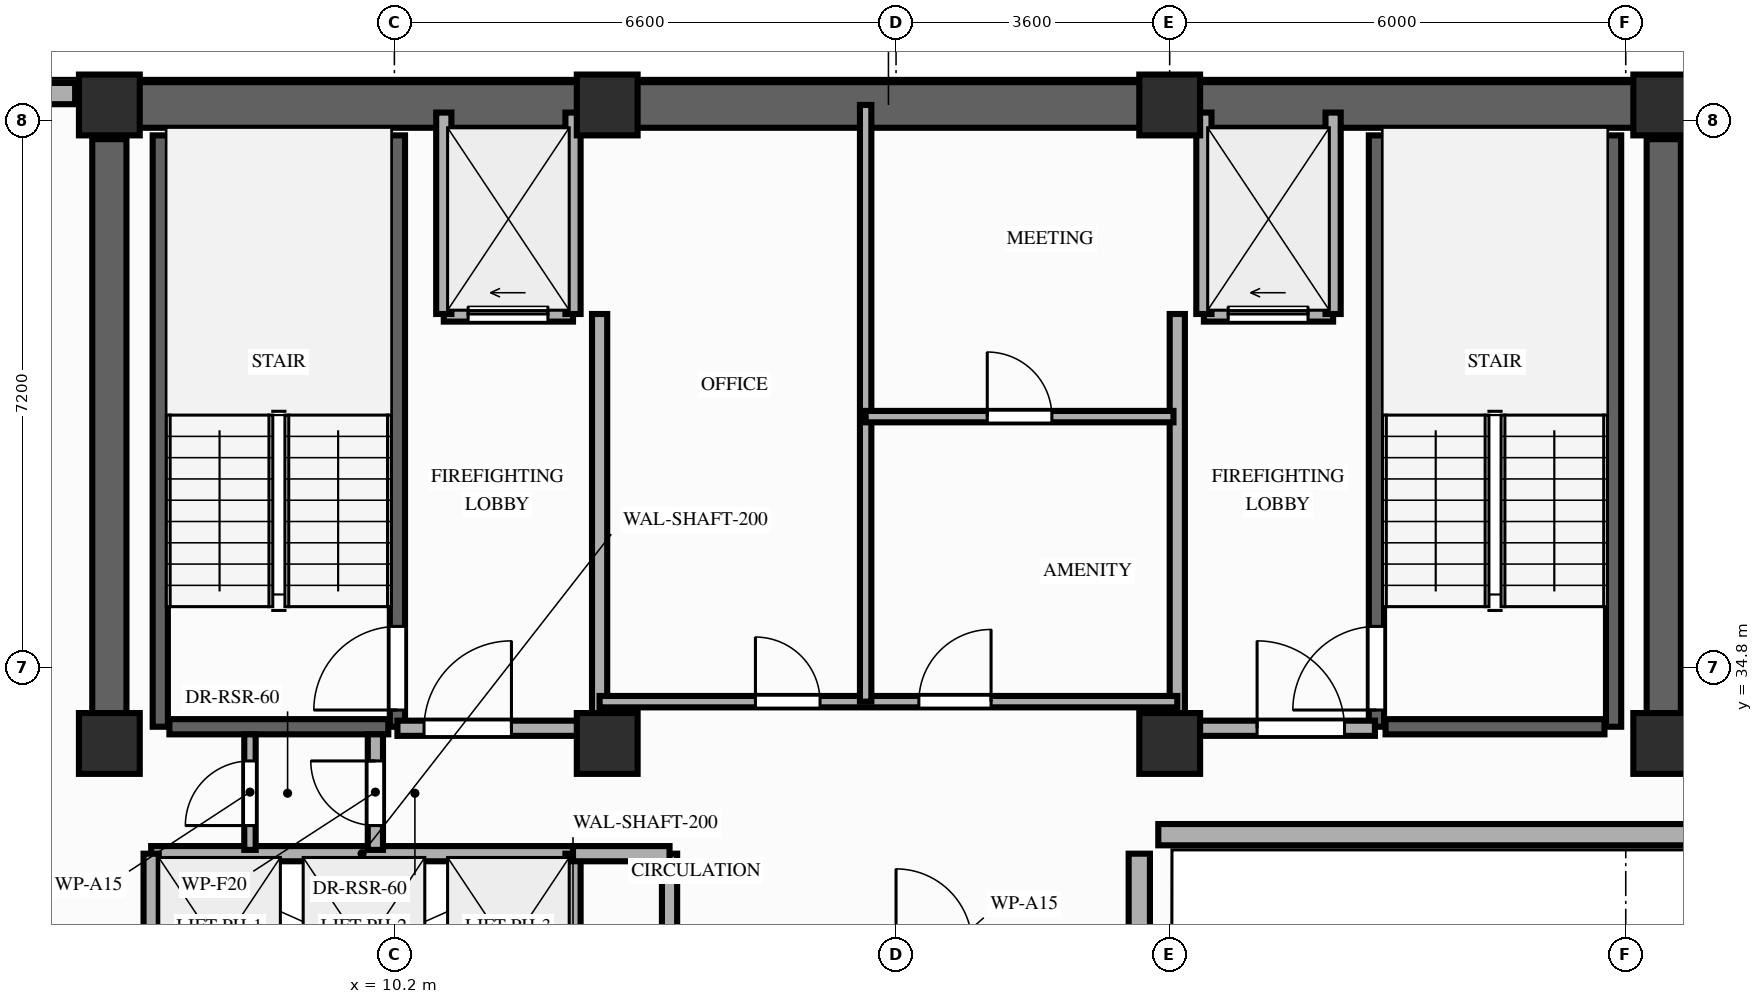
"""IFC4 building model, lengths in metres.
Left out: names, types, materials, properties, quantities, classifications, styles, units other than length and angle.
Written with IfcOpenShell. Run it as: python <this file> out.ifc"""

import sys

from ifc_helpers import new_model, si_unit, direction, frame, frame_2d, origin, origin_2d, place, context, subcontext, project, spatial, rectangle, extrude, element, fill, save


model = new_model("IFC4")
c1 = context("Model", 3, precision=1e-05, world=origin(), true_north=direction((0.0, 1.0)))
c2 = subcontext(c1, "Body", "Model", "MODEL_VIEW")
j1 = project(units=[si_unit("LENGTHUNIT", "METRE"), si_unit("PLANEANGLEUNIT", "RADIAN")], contexts=[c1])
p1 = place(None, origin())
s1 = spatial("IfcSite", under=j1, at=p1, CompositionType="ELEMENT")
p2 = place(p1, origin())
s2 = spatial("IfcBuilding", under=s1, at=p2, CompositionType="ELEMENT")
p3 = place(p2, frame((0.0, 0.0, 240.8)))
s3 = spatial("IfcBuildingStorey", under=s2, at=p3, CompositionType="ELEMENT", Elevation=240.8)
for number, where, z_axis, x_axis in (
    (1, (6.45, 33.8, 0.0), (0.0, 0.0, 1.0), (1.0, 0.0, 0.0)),
    (2, (13.0, 33.8, 0.0), (0.0, 0.0, 1.0), (1.0, 0.0, 0.0)),
    (3, (20.4, 33.8, 0.0), (0.0, 0.0, 1.0), (1.0, 0.0, 0.0)),
    (4, (26.9, 33.8, 0.0), (0.0, 0.0, 1.0), (1.0, 0.0, 0.0)),
    (5, (6.45, 42.2, 0.0), (0.0, 0.0, 1.0), (1.0, 0.0, 0.0)),
    (6, (13.0, 42.2, 0.0), (0.0, 0.0, 1.0), (1.0, 0.0, 0.0)),
    (7, (20.4, 42.2, 0.0), (0.0, 0.0, 1.0), (1.0, 0.0, 0.0)),
    (8, (26.9, 42.2, 0.0), (0.0, 0.0, 1.0), (1.0, 0.0, 0.0)),
):
    element("IfcColumn", number, at=place(p3, frame(where, z_axis=z_axis, x_axis=x_axis)), inside=s3, PredefinedType="COLUMN", context=c2, shape_type="SweptSolid", body=[
        extrude(rectangle(XDim=0.8, YDim=0.8, at=origin_2d()), origin(), (0.0, 0.0, 1.0), 3.2),
    ])
p4 = place(p3, frame((20.0, 10.8, 0.0), z_axis=(0.0, 0.0, 1.0), x_axis=(0.0, 1.0, 0.0)))
e9 = element("IfcWall", 9, at=p4, inside=s3, PredefinedType="STANDARD", context=c2, shape_type="SweptSolid", body=[
    extrude(rectangle(XDim=21.55, YDim=0.28, at=frame_2d((10.775, 0.0))), origin(), (0.0, 0.0, 1.0), 2.55),
])
p5 = place(p4, frame((3.08, 0.0, 0.85)))
e10 = element("IfcOpeningElement", 10, at=p5, cuts=e9, PredefinedType="OPENING", context=c2, shape_type="SweptSolid", body=[
    extrude(rectangle(XDim=2.6, YDim=1.45, at=frame_2d((1.3, 0.725))), frame((0.0, 0.15, 0.0), z_axis=(0.0, -1.0, 0.0), x_axis=(1.0, 0.0, 0.0)), (0.0, 0.0, 1.0), 0.3),
])
p6 = place(p4, frame((8.61, 0.0, 0.85)))
e11 = element("IfcOpeningElement", 11, at=p6, cuts=e9, PredefinedType="OPENING", context=c2, shape_type="SweptSolid", body=[
    extrude(rectangle(XDim=1.8, YDim=1.45, at=frame_2d((0.9, 0.725))), frame((0.0, 0.15, 0.0), z_axis=(0.0, -1.0, 0.0), x_axis=(1.0, 0.0, 0.0)), (0.0, 0.0, 1.0), 0.3),
])
p7 = place(p3, frame((6.0, 42.35, 0.0), z_axis=(0.0, 0.0, 1.0), x_axis=(-1.0, 0.0, 0.0)))
e12 = element("IfcWall", 12, at=p7, inside=s3, PredefinedType="STANDARD", context=c2, shape_type="SweptSolid", body=[
    extrude(rectangle(XDim=1.0, YDim=0.28, at=frame_2d((0.5, 0.0))), origin(), (0.0, 0.0, 1.0), 3.02),
])
p8 = place(p3, frame((20.25, 32.6, 0.0), z_axis=(0.0, 0.0, 1.0), x_axis=(1.0, 0.0, 0.0)))
e13 = element("IfcWall", 13, at=p8, inside=s3, PredefinedType="STANDARD", context=c2, shape_type="SweptSolid", body=[
    extrude(rectangle(XDim=7.35, YDim=0.28, at=frame_2d((3.675, 0.0))), origin(), (0.0, 0.0, 1.0), 2.55),
])
p9 = place(p3, frame((6.45, 42.2, 0.0), z_axis=(0.0, 0.0, 1.0), x_axis=(1.0, 0.0, 0.0)))
e14 = element("IfcWall", 14, at=p9, inside=s3, PredefinedType="SHEAR", context=c2, shape_type="SweptSolid", body=[
    extrude(rectangle(XDim=20.45, YDim=0.6, at=frame_2d((10.225, 0.0))), origin(), (0.0, 0.0, 1.0), 3.02),
])
for number, where, z_axis, x_axis in (
    (15, (6.45, 33.8, 0.0), (0.0, 0.0, 1.0), (0.0, 1.0, 0.0)),
    (16, (26.9, 33.8, 0.0), (0.0, 0.0, 1.0), (0.0, 1.0, 0.0)),
):
    element("IfcWall", number, at=place(p3, frame(where, z_axis=z_axis, x_axis=x_axis)), inside=s3, PredefinedType="SHEAR", context=c2, shape_type="SweptSolid", body=[
        extrude(rectangle(XDim=7.95, YDim=0.45, at=frame_2d((3.975, 0.0))), origin(), (0.0, 0.0, 1.0), 3.02),
    ])
p10 = place(p3, frame((7.12, 34.02, 0.0), z_axis=(0.0, 0.0, 1.0), x_axis=(0.0, 1.0, 0.0)))
e17 = element("IfcWall", 17, at=p10, inside=s3, PredefinedType="SHEAR", context=c2, shape_type="SweptSolid", body=[
    extrude(rectangle(XDim=7.78, YDim=0.2, at=frame_2d((3.89, 0.0))), origin(), (0.0, 0.0, 1.0), 3.02),
])
p11 = place(p3, frame((10.24, 34.02, 0.0), z_axis=(0.0, 0.0, 1.0), x_axis=(0.0, 1.0, 0.0)))
e18 = element("IfcWall", 18, at=p11, inside=s3, PredefinedType="SHEAR", context=c2, shape_type="SweptSolid", body=[
    extrude(rectangle(XDim=7.78, YDim=0.2, at=frame_2d((3.89, 0.0))), origin(), (0.0, 0.0, 1.0), 3.02),
])
p12 = place(p11, frame((0.22, 0.0, 0.0)))
e19 = element("IfcOpeningElement", 19, at=p12, cuts=e18, PredefinedType="OPENING", context=c2, shape_type="SweptSolid", body=[
    extrude(rectangle(XDim=1.1, YDim=2.15, at=frame_2d((0.55, 1.075))), frame((0.0, 0.11, 0.0), z_axis=(0.0, -1.0, 0.0), x_axis=(1.0, 0.0, 0.0)), (0.0, 0.0, 1.0), 0.22),
])
p13 = place(p3, frame((7.24, 34.02, 0.0), z_axis=(0.0, 0.0, 1.0), x_axis=(1.0, 0.0, 0.0)))
e20 = element("IfcWall", 20, at=p13, inside=s3, PredefinedType="SHEAR", context=c2, shape_type="SweptSolid", body=[
    extrude(rectangle(XDim=2.88, YDim=0.2, at=frame_2d((1.44, 0.0))), origin(), (0.0, 0.0, 1.0), 3.02),
])
p14 = place(p3, frame((23.12, 34.02, 0.0), z_axis=(0.0, 0.0, 1.0), x_axis=(0.0, 1.0, 0.0)))
e21 = element("IfcWall", 21, at=p14, inside=s3, PredefinedType="SHEAR", context=c2, shape_type="SweptSolid", body=[
    extrude(rectangle(XDim=7.78, YDim=0.2, at=frame_2d((3.89, 0.0))), origin(), (0.0, 0.0, 1.0), 3.02),
])
p15 = place(p14, frame((0.22, 0.0, 0.0)))
e22 = element("IfcOpeningElement", 22, at=p15, cuts=e21, PredefinedType="OPENING", context=c2, shape_type="SweptSolid", body=[
    extrude(rectangle(XDim=1.1, YDim=2.15, at=frame_2d((0.55, 1.075))), frame((0.0, 0.11, 0.0), z_axis=(0.0, -1.0, 0.0), x_axis=(1.0, 0.0, 0.0)), (0.0, 0.0, 1.0), 0.22),
])
p16 = place(p3, frame((26.24, 34.02, 0.0), z_axis=(0.0, 0.0, 1.0), x_axis=(0.0, 1.0, 0.0)))
e23 = element("IfcWall", 23, at=p16, inside=s3, PredefinedType="SHEAR", context=c2, shape_type="SweptSolid", body=[
    extrude(rectangle(XDim=7.78, YDim=0.2, at=frame_2d((3.89, 0.0))), origin(), (0.0, 0.0, 1.0), 3.02),
])
p17 = place(p3, frame((23.24, 34.02, 0.0), z_axis=(0.0, 0.0, 1.0), x_axis=(1.0, 0.0, 0.0)))
e24 = element("IfcWall", 24, at=p17, inside=s3, PredefinedType="SHEAR", context=c2, shape_type="SweptSolid", body=[
    extrude(rectangle(XDim=2.88, YDim=0.2, at=frame_2d((1.44, 0.0))), origin(), (0.0, 0.0, 1.0), 3.02),
])
p18 = place(p3, frame((7.0, 32.35, 0.0), z_axis=(0.0, 0.0, 1.0), x_axis=(1.0, 0.0, 0.0)))
e25 = element("IfcWall", 25, at=p18, inside=s3, PredefinedType="MOVABLE", context=c2, shape_type="SweptSolid", body=[
    extrude(rectangle(XDim=5.55, YDim=0.2, at=frame_2d((2.775, 0.0))), origin(), (0.0, 0.0, 1.0), 3.02),
])
for number, where, z_axis, x_axis in (
    (26, (7.0, 29.85, 0.0), (0.0, 0.0, 1.0), (0.0, 1.0, 0.0)),
    (27, (12.55, 29.85, 0.0), (0.0, 0.0, 1.0), (0.0, 1.0, 0.0)),
):
    element("IfcWall", number, at=place(p3, frame(where, z_axis=z_axis, x_axis=x_axis)), inside=s3, PredefinedType="MOVABLE", context=c2, shape_type="SweptSolid", body=[
        extrude(rectangle(XDim=2.5, YDim=0.2, at=frame_2d((1.25, 0.0))), origin(), (0.0, 0.0, 1.0), 3.02),
    ])
p19 = place(p3, frame((10.85, 39.45, 0.0), z_axis=(0.0, 0.0, 1.0), x_axis=(1.0, 0.0, 0.0)))
e28 = element("IfcWall", 28, at=p19, inside=s3, PredefinedType="MOVABLE", context=c2, shape_type="SweptSolid", body=[
    extrude(rectangle(XDim=1.7, YDim=0.2, at=frame_2d((0.85, 0.0))), origin(), (0.0, 0.0, 1.0), 3.02),
])
p20 = place(p19, frame((0.32, 0.0, 0.0)))
e29 = element("IfcOpeningElement", 29, at=p20, cuts=e28, PredefinedType="OPENING", context=c2, shape_type="SweptSolid", body=[
    extrude(rectangle(XDim=1.05, YDim=2.15, at=frame_2d((0.525, 1.075))), frame((0.0, 0.11, 0.0), z_axis=(0.0, -1.0, 0.0), x_axis=(1.0, 0.0, 0.0)), (0.0, 0.0, 1.0), 0.22),
])
p21 = place(p3, frame((20.85, 39.45, 0.0), z_axis=(0.0, 0.0, 1.0), x_axis=(1.0, 0.0, 0.0)))
e30 = element("IfcWall", 30, at=p21, inside=s3, PredefinedType="MOVABLE", context=c2, shape_type="SweptSolid", body=[
    extrude(rectangle(XDim=1.7, YDim=0.2, at=frame_2d((0.85, 0.0))), origin(), (0.0, 0.0, 1.0), 3.02),
])
p22 = place(p21, frame((0.32, 0.0, 0.0)))
e31 = element("IfcOpeningElement", 31, at=p22, cuts=e30, PredefinedType="OPENING", context=c2, shape_type="SweptSolid", body=[
    extrude(rectangle(XDim=1.05, YDim=2.15, at=frame_2d((0.525, 1.075))), frame((0.0, 0.11, 0.0), z_axis=(0.0, -1.0, 0.0), x_axis=(1.0, 0.0, 0.0)), (0.0, 0.0, 1.0), 0.22),
])
for number, where, z_axis, x_axis in (
    (32, (10.85, 39.45, 0.0), (0.0, 0.0, 1.0), (0.0, 1.0, 0.0)),
    (33, (12.55, 39.45, 0.0), (0.0, 0.0, 1.0), (0.0, 1.0, 0.0)),
):
    element("IfcWall", number, at=place(p3, frame(where, z_axis=z_axis, x_axis=x_axis)), inside=s3, PredefinedType="MOVABLE", context=c2, shape_type="SweptSolid", body=[
        extrude(rectangle(XDim=2.65, YDim=0.2, at=frame_2d((1.325, 0.0))), origin(), (0.0, 0.0, 1.0), 2.55),
    ])
p23 = place(p3, frame((12.9, 34.0, 0.0), z_axis=(0.0, 0.0, 1.0), x_axis=(0.0, 1.0, 0.0)))
e34 = element("IfcWall", 34, at=p23, inside=s3, PredefinedType="PARTITIONING", context=c2, shape_type="SweptSolid", body=[
    extrude(rectangle(XDim=5.45, YDim=0.2, at=frame_2d((2.725, 0.0))), origin(), (0.0, 0.0, 1.0), 2.55),
])
p24 = place(p3, frame((10.24, 34.0, 0.0), z_axis=(0.0, 0.0, 1.0), x_axis=(1.0, 0.0, 0.0)))
e35 = element("IfcWall", 35, at=p24, inside=s3, PredefinedType="PARTITIONING", context=c2, shape_type="SweptSolid", body=[
    extrude(rectangle(XDim=2.66, YDim=0.2, at=frame_2d((1.33, 0.0))), origin(), (0.0, 0.0, 1.0), 2.55),
])
p25 = place(p24, frame((0.35, 0.0, 0.0)))
e36 = element("IfcOpeningElement", 36, at=p25, cuts=e35, PredefinedType="OPENING", context=c2, shape_type="SweptSolid", body=[
    extrude(rectangle(XDim=1.15, YDim=2.15, at=frame_2d((0.575, 1.075))), frame((0.0, 0.11, 0.0), z_axis=(0.0, -1.0, 0.0), x_axis=(1.0, 0.0, 0.0)), (0.0, 0.0, 1.0), 0.22),
])
for number, where, z_axis, x_axis in (
    (37, (20.85, 39.45, 0.0), (0.0, 0.0, 1.0), (0.0, 1.0, 0.0)),
    (38, (22.55, 39.45, 0.0), (0.0, 0.0, 1.0), (0.0, 1.0, 0.0)),
):
    element("IfcWall", number, at=place(p3, frame(where, z_axis=z_axis, x_axis=x_axis)), inside=s3, PredefinedType="MOVABLE", context=c2, shape_type="SweptSolid", body=[
        extrude(rectangle(XDim=2.65, YDim=0.2, at=frame_2d((1.325, 0.0))), origin(), (0.0, 0.0, 1.0), 2.55),
    ])
p26 = place(p3, frame((20.5, 34.0, 0.0), z_axis=(0.0, 0.0, 1.0), x_axis=(0.0, 1.0, 0.0)))
e39 = element("IfcWall", 39, at=p26, inside=s3, PredefinedType="PARTITIONING", context=c2, shape_type="SweptSolid", body=[
    extrude(rectangle(XDim=5.45, YDim=0.2, at=frame_2d((2.725, 0.0))), origin(), (0.0, 0.0, 1.0), 2.55),
])
p27 = place(p3, frame((20.5, 34.0, 0.0), z_axis=(0.0, 0.0, 1.0), x_axis=(1.0, 0.0, 0.0)))
e40 = element("IfcWall", 40, at=p27, inside=s3, PredefinedType="PARTITIONING", context=c2, shape_type="SweptSolid", body=[
    extrude(rectangle(XDim=2.6, YDim=0.2, at=frame_2d((1.3, 0.0))), origin(), (0.0, 0.0, 1.0), 2.55),
])
p28 = place(p27, frame((1.05, 0.0, 0.0)))
e41 = element("IfcOpeningElement", 41, at=p28, cuts=e40, PredefinedType="OPENING", context=c2, shape_type="SweptSolid", body=[
    extrude(rectangle(XDim=1.15, YDim=2.15, at=frame_2d((0.575, 1.075))), frame((0.0, 0.11, 0.0), z_axis=(0.0, -1.0, 0.0), x_axis=(1.0, 0.0, 0.0)), (0.0, 0.0, 1.0), 0.22),
])
p29 = place(p3, frame((9.95, 32.4, 0.0), z_axis=(0.0, 0.0, 1.0), x_axis=(0.0, 1.0, 0.0)))
e42 = element("IfcWall", 42, at=p29, inside=s3, PredefinedType="PARTITIONING", context=c2, shape_type="SweptSolid", body=[
    extrude(rectangle(XDim=1.52, YDim=0.2, at=frame_2d((0.76, 0.0))), origin(), (0.0, 0.0, 1.0), 2.55),
])
p30 = place(p29, frame((0.32, 0.0, 0.0)))
e43 = element("IfcOpeningElement", 43, at=p30, cuts=e42, PredefinedType="OPENING", context=c2, shape_type="SweptSolid", body=[
    extrude(rectangle(XDim=0.85, YDim=2.05, at=frame_2d((0.425, 1.025))), frame((0.0, 0.11, 0.0), z_axis=(0.0, -1.0, 0.0), x_axis=(1.0, 0.0, 0.0)), (0.0, 0.0, 1.0), 0.22),
])
p31 = place(p3, frame((8.3, 32.4, 0.0), z_axis=(0.0, 0.0, 1.0), x_axis=(0.0, 1.0, 0.0)))
e44 = element("IfcWall", 44, at=p31, inside=s3, PredefinedType="PARTITIONING", context=c2, shape_type="SweptSolid", body=[
    extrude(rectangle(XDim=1.52, YDim=0.15, at=frame_2d((0.76, 0.0))), origin(), (0.0, 0.0, 1.0), 2.55),
])
p32 = place(p31, frame((0.32, 0.0, 0.0)))
e45 = element("IfcOpeningElement", 45, at=p32, cuts=e44, PredefinedType="OPENING", context=c2, shape_type="SweptSolid", body=[
    extrude(rectangle(XDim=0.85, YDim=2.05, at=frame_2d((0.425, 1.025))), frame((0.0, 0.085, 0.0), z_axis=(0.0, -1.0, 0.0), x_axis=(1.0, 0.0, 0.0)), (0.0, 0.0, 1.0), 0.17),
])
p33 = place(p3, frame((13.82, 29.85, 0.0), z_axis=(0.0, 0.0, 1.0), x_axis=(0.0, 1.0, 0.0)))
e46 = element("IfcWall", 46, at=p33, inside=s3, PredefinedType="PARTITIONING", context=c2, shape_type="SweptSolid", body=[
    extrude(rectangle(XDim=2.5, YDim=0.2, at=frame_2d((1.25, 0.0))), origin(), (0.0, 0.0, 1.0), 3.02),
])
p34 = place(p3, frame((12.55, 32.35, 0.0), z_axis=(0.0, 0.0, 1.0), x_axis=(1.0, 0.0, 0.0)))
e47 = element("IfcWall", 47, at=p34, inside=s3, PredefinedType="PARTITIONING", context=c2, shape_type="SweptSolid", body=[
    extrude(rectangle(XDim=1.27, YDim=0.2, at=frame_2d((0.635, 0.0))), origin(), (0.0, 0.0, 1.0), 3.02),
])
p35 = place(p3, frame((12.9, 34.35, 0.0), z_axis=(0.0, 0.0, 1.0), x_axis=(1.0, 0.0, 0.0)))
e48 = element("IfcWall", 48, at=p35, inside=s3, PredefinedType="PARTITIONING", context=c2, shape_type="SweptSolid", body=[
    extrude(rectangle(XDim=7.6, YDim=0.15, at=frame_2d((3.8, 0.0))), origin(), (0.0, 0.0, 1.0), 3.02),
])
p36 = place(p35, frame((2.05, 0.0, 0.0)))
e49 = element("IfcOpeningElement", 49, at=p36, cuts=e48, PredefinedType="OPENING", context=c2, shape_type="SweptSolid", body=[
    extrude(rectangle(XDim=0.85, YDim=2.05, at=frame_2d((0.425, 1.025))), frame((0.0, 0.085, 0.0), z_axis=(0.0, -1.0, 0.0), x_axis=(1.0, 0.0, 0.0)), (0.0, 0.0, 1.0), 0.17),
])
p37 = place(p35, frame((4.2, 0.0, 0.0)))
e50 = element("IfcOpeningElement", 50, at=p37, cuts=e48, PredefinedType="OPENING", context=c2, shape_type="SweptSolid", body=[
    extrude(rectangle(XDim=0.95, YDim=2.15, at=frame_2d((0.475, 1.075))), frame((0.0, 0.085, 0.0), z_axis=(0.0, -1.0, 0.0), x_axis=(1.0, 0.0, 0.0)), (0.0, 0.0, 1.0), 0.17),
])
p38 = place(p3, frame((16.4, 34.35, 0.0), z_axis=(0.0, 0.0, 1.0), x_axis=(0.0, 1.0, 0.0)))
e51 = element("IfcWall", 51, at=p38, inside=s3, PredefinedType="PARTITIONING", context=c2, shape_type="SweptSolid", body=[
    extrude(rectangle(XDim=7.85, YDim=0.15, at=frame_2d((3.925, 0.0))), origin(), (0.0, 0.0, 1.0), 2.55),
])
p39 = place(p3, frame((16.4, 38.1, 0.0), z_axis=(0.0, 0.0, 1.0), x_axis=(1.0, 0.0, 0.0)))
e52 = element("IfcWall", 52, at=p39, inside=s3, PredefinedType="PARTITIONING", context=c2, shape_type="SweptSolid", body=[
    extrude(rectangle(XDim=4.05, YDim=0.15, at=frame_2d((2.025, 0.0))), origin(), (0.0, 0.0, 1.0), 3.02),
])
p40 = place(p39, frame((1.6, 0.0, 0.0)))
e53 = element("IfcOpeningElement", 53, at=p40, cuts=e52, PredefinedType="OPENING", context=c2, shape_type="SweptSolid", body=[
    extrude(rectangle(XDim=0.85, YDim=2.05, at=frame_2d((0.425, 1.025))), frame((0.0, 0.085, 0.0), z_axis=(0.0, -1.0, 0.0), x_axis=(1.0, 0.0, 0.0)), (0.0, 0.0, 1.0), 0.17),
])
p41 = place(p12, origin())
e54 = element("IfcDoor", 54, at=p41, inside=s3, OperationType="SINGLE_SWING_LEFT", PredefinedType="DOOR", context=c2, shape_type="SweptSolid", body=[
    extrude(rectangle(XDim=1.1, YDim=2.15, at=frame_2d((0.55, 1.075))), frame((0.0, 0.025, 0.0), z_axis=(0.0, -1.0, 0.0), x_axis=(1.0, 0.0, 0.0)), (0.0, 0.0, 1.0), 0.05),
])
fill(e19, e54)
p42 = place(p15, origin())
e55 = element("IfcDoor", 55, at=p42, inside=s3, OperationType="SINGLE_SWING_LEFT", PredefinedType="DOOR", context=c2, shape_type="SweptSolid", body=[
    extrude(rectangle(XDim=1.1, YDim=2.15, at=frame_2d((0.55, 1.075))), frame((0.0, 0.025, 0.0), z_axis=(0.0, -1.0, 0.0), x_axis=(1.0, 0.0, 0.0)), (0.0, 0.0, 1.0), 0.05),
])
fill(e22, e55)
p43 = place(p20, origin())
e56 = element("IfcDoor", 56, at=p43, inside=s3, OperationType="SLIDING_TO_LEFT", PredefinedType="DOOR", context=c2, shape_type="SweptSolid", body=[
    extrude(rectangle(XDim=1.05, YDim=2.15, at=frame_2d((0.525, 1.075))), frame((0.0, 0.025, 0.0), z_axis=(0.0, -1.0, 0.0), x_axis=(1.0, 0.0, 0.0)), (0.0, 0.0, 1.0), 0.05),
])
fill(e29, e56)
p44 = place(p22, origin())
e57 = element("IfcDoor", 57, at=p44, inside=s3, OperationType="SLIDING_TO_LEFT", PredefinedType="DOOR", context=c2, shape_type="SweptSolid", body=[
    extrude(rectangle(XDim=1.05, YDim=2.15, at=frame_2d((0.525, 1.075))), frame((0.0, 0.025, 0.0), z_axis=(0.0, -1.0, 0.0), x_axis=(1.0, 0.0, 0.0)), (0.0, 0.0, 1.0), 0.05),
])
fill(e31, e57)
p45 = place(p25, origin())
e58 = element("IfcDoor", 58, at=p45, inside=s3, OperationType="SINGLE_SWING_RIGHT", PredefinedType="DOOR", context=c2, shape_type="SweptSolid", body=[
    extrude(rectangle(XDim=1.15, YDim=2.15, at=frame_2d((0.575, 1.075))), frame((0.0, 0.025, 0.0), z_axis=(0.0, -1.0, 0.0), x_axis=(1.0, 0.0, 0.0)), (0.0, 0.0, 1.0), 0.05),
])
fill(e36, e58)
p46 = place(p28, origin())
e59 = element("IfcDoor", 59, at=p46, inside=s3, OperationType="SINGLE_SWING_LEFT", PredefinedType="DOOR", context=c2, shape_type="SweptSolid", body=[
    extrude(rectangle(XDim=1.15, YDim=2.15, at=frame_2d((0.575, 1.075))), frame((0.0, 0.025, 0.0), z_axis=(0.0, -1.0, 0.0), x_axis=(1.0, 0.0, 0.0)), (0.0, 0.0, 1.0), 0.05),
])
fill(e41, e59)
p47 = place(p30, origin())
e60 = element("IfcDoor", 60, at=p47, inside=s3, OperationType="SINGLE_SWING_RIGHT", PredefinedType="DOOR", context=c2, shape_type="SweptSolid", body=[
    extrude(rectangle(XDim=0.85, YDim=2.05, at=frame_2d((0.425, 1.025))), frame((0.0, 0.025, 0.0), z_axis=(0.0, -1.0, 0.0), x_axis=(1.0, 0.0, 0.0)), (0.0, 0.0, 1.0), 0.05),
])
fill(e43, e60)
p48 = place(p32, origin())
e61 = element("IfcDoor", 61, at=p48, inside=s3, OperationType="SINGLE_SWING_LEFT", PredefinedType="DOOR", context=c2, shape_type="SweptSolid", body=[
    extrude(rectangle(XDim=0.85, YDim=2.05, at=frame_2d((0.425, 1.025))), frame((0.0, 0.025, 0.0), z_axis=(0.0, -1.0, 0.0), x_axis=(1.0, 0.0, 0.0)), (0.0, 0.0, 1.0), 0.05),
])
fill(e45, e61)
p49 = place(p36, origin())
e62 = element("IfcDoor", 62, at=p49, inside=s3, OperationType="SINGLE_SWING_LEFT", PredefinedType="DOOR", context=c2, shape_type="SweptSolid", body=[
    extrude(rectangle(XDim=0.85, YDim=2.05, at=frame_2d((0.425, 1.025))), frame((0.0, 0.025, 0.0), z_axis=(0.0, -1.0, 0.0), x_axis=(1.0, 0.0, 0.0)), (0.0, 0.0, 1.0), 0.05),
])
fill(e49, e62)
p50 = place(p37, origin())
e63 = element("IfcDoor", 63, at=p50, inside=s3, OperationType="SINGLE_SWING_RIGHT", PredefinedType="DOOR", context=c2, shape_type="SweptSolid", body=[
    extrude(rectangle(XDim=0.95, YDim=2.15, at=frame_2d((0.475, 1.075))), frame((0.0, 0.025, 0.0), z_axis=(0.0, -1.0, 0.0), x_axis=(1.0, 0.0, 0.0)), (0.0, 0.0, 1.0), 0.05),
])
fill(e50, e63)
p51 = place(p40, origin())
e64 = element("IfcDoor", 64, at=p51, inside=s3, OperationType="SINGLE_SWING_LEFT", PredefinedType="DOOR", context=c2, shape_type="SweptSolid", body=[
    extrude(rectangle(XDim=0.85, YDim=2.05, at=frame_2d((0.425, 1.025))), frame((0.0, 0.025, 0.0), z_axis=(0.0, -1.0, 0.0), x_axis=(1.0, 0.0, 0.0)), (0.0, 0.0, 1.0), 0.05),
])
fill(e53, e64)
save(model, sys.argv[1])
